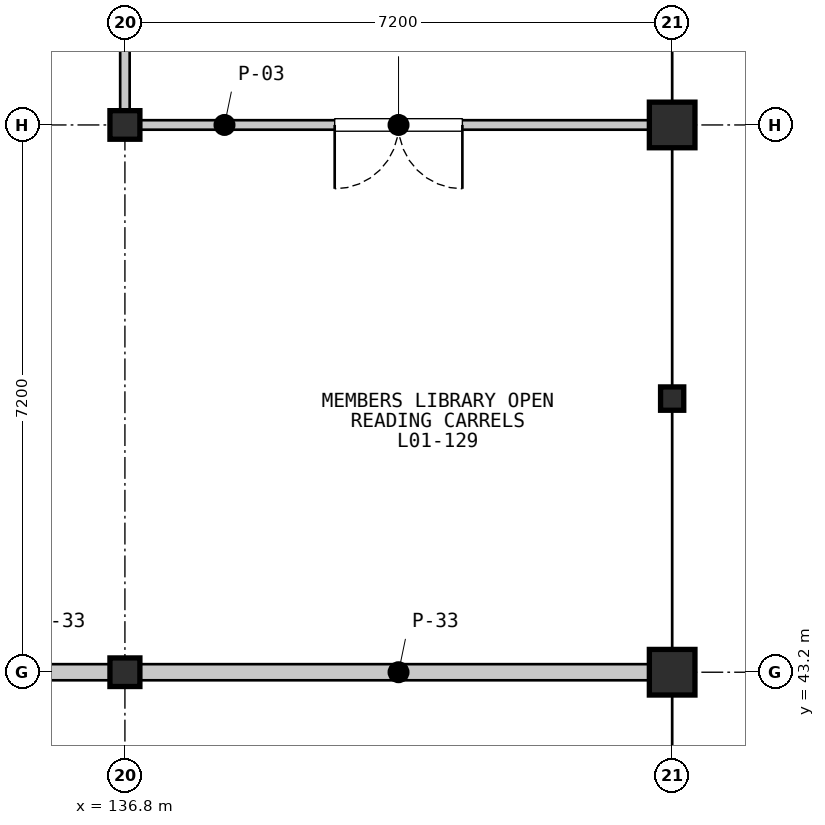
"""IFC4 building model, lengths in metres.
Left out: names, types, materials, properties, quantities, classifications, styles, units other than length and angle.
Written with IfcOpenShell. Run it as: python <this file> out.ifc"""

import sys

from ifc_helpers import new_model, si_unit, direction, frame, frame_2d, origin, origin_2d, place, context, subcontext, project, spatial, rectangle, i_section, extrude, element, fill, save


model = new_model("IFC4")
c1 = context("Model", 3, precision=1e-05, world=origin(), true_north=direction((0.0, 1.0)))
c2 = subcontext(c1, "Body", "Model", "MODEL_VIEW")
j1 = project(units=[si_unit("LENGTHUNIT", "METRE"), si_unit("PLANEANGLEUNIT", "RADIAN")], contexts=[c1])
p1 = place(None, origin())
s1 = spatial("IfcSite", under=j1, at=p1, CompositionType="ELEMENT")
p2 = place(p1, origin())
s2 = spatial("IfcBuilding", under=s1, at=p2, CompositionType="ELEMENT")
p3 = place(p2, origin())
s3 = spatial("IfcBuildingStorey", under=s2, at=p3, CompositionType="ELEMENT", Elevation=0.0)
for number, where, z_axis, x_axis in (
    (1, (136.8, 43.2, 0.0), (0.0, 0.0, 1.0), (1.0, 0.0, 0.0)),
    (2, (136.8, 50.4, 0.0), (0.0, 0.0, 1.0), (1.0, 0.0, 0.0)),
):
    element("IfcColumn", number, at=place(p3, frame(where, z_axis=z_axis, x_axis=x_axis)), inside=s3, PredefinedType="COLUMN", context=c2, shape_type="SweptSolid", body=[
        extrude(i_section(OverallWidth=0.394, OverallDepth=0.376, WebThickness=0.017, FlangeThickness=0.028, FilletRadius=0.015, at=origin_2d()), origin(), (0.0, 0.0, 1.0), 5.4),
    ])
for number, where, z_axis, x_axis in (
    (3, (144.0, 43.2, 0.0), (0.0, 0.0, 1.0), (1.0, 0.0, 0.0)),
    (4, (144.0, 50.4, 0.0), (0.0, 0.0, 1.0), (1.0, 0.0, 0.0)),
):
    element("IfcColumn", number, at=place(p3, frame(where, z_axis=z_axis, x_axis=x_axis)), inside=s3, PredefinedType="COLUMN", context=c2, shape_type="SweptSolid", body=[
        extrude(rectangle(XDim=0.6, YDim=0.6, at=origin_2d()), origin(), (0.0, 0.0, 1.0), 5.4),
    ])
p4 = place(p3, frame((144.0, 46.8, 0.0), z_axis=(0.0, 0.0, 1.0), x_axis=(1.0, 0.0, 0.0)))
e5 = element("IfcColumn", 5, at=p4, inside=s3, PredefinedType="PILASTER", context=c2, shape_type="SweptSolid", body=[
    extrude(i_section(OverallWidth=0.305, OverallDepth=0.307, WebThickness=0.01, FlangeThickness=0.015, FilletRadius=0.015, at=origin_2d()), origin(), (0.0, 0.0, 1.0), 5.4),
])
p5 = place(p3, frame((129.72, 43.2, 0.0), z_axis=(0.0, 0.0, 1.0), x_axis=(1.0, 0.0, 0.0)))
e6 = element("IfcWall", 6, at=p5, inside=s3, PredefinedType="PARTITIONING", context=c2, shape_type="SweptSolid", body=[
    extrude(rectangle(XDim=6.96, YDim=0.212, at=frame_2d((3.48, 0.0))), origin(), (0.0, 0.0, 1.0), 4.428),
])
p6 = place(p5, frame((2.64, 0.0, 0.0)))
e7 = element("IfcOpeningElement", 7, at=p6, cuts=e6, PredefinedType="OPENING", context=c2, shape_type="SweptSolid", body=[
    extrude(rectangle(XDim=1.68, YDim=2.35, at=frame_2d((0.84, 1.175))), frame((0.0, 0.116, 0.0), z_axis=(0.0, -1.0, 0.0), x_axis=(1.0, 0.0, 0.0)), (0.0, 0.0, 1.0), 0.232),
])
p7 = place(p3, frame((136.92, 43.2, 0.0), z_axis=(0.0, 0.0, 1.0), x_axis=(1.0, 0.0, 0.0)))
e8 = element("IfcWall", 8, at=p7, inside=s3, PredefinedType="PARTITIONING", context=c2, shape_type="SweptSolid", body=[
    extrude(rectangle(XDim=6.96, YDim=0.212, at=frame_2d((3.48, 0.0))), origin(), (0.0, 0.0, 1.0), 4.588),
])
p8 = place(p3, frame((143.88, 50.4, 0.0), z_axis=(0.0, 0.0, 1.0), x_axis=(-1.0, 0.0, 0.0)))
e9 = element("IfcWall", 9, at=p8, inside=s3, PredefinedType="PARTITIONING", context=c2, shape_type="SweptSolid", body=[
    extrude(rectangle(XDim=6.96, YDim=0.125, at=frame_2d((3.48, 0.0))), origin(), (0.0, 0.0, 1.0), 4.588),
])
p9 = place(p8, frame((2.64, 0.0, 0.0)))
e10 = element("IfcOpeningElement", 10, at=p9, cuts=e9, PredefinedType="OPENING", context=c2, shape_type="SweptSolid", body=[
    extrude(rectangle(XDim=1.68, YDim=2.35, at=frame_2d((0.84, 1.175))), frame((0.0, 0.073, 0.0), z_axis=(0.0, -1.0, 0.0), x_axis=(1.0, 0.0, 0.0)), (0.0, 0.0, 1.0), 0.145),
])
p10 = place(p3, frame((136.8, 50.52, 0.0), z_axis=(0.0, 0.0, 1.0), x_axis=(0.0, 1.0, 0.0)))
e11 = element("IfcWall", 11, at=p10, inside=s3, PredefinedType="PARTITIONING", context=c2, shape_type="SweptSolid", body=[
    extrude(rectangle(XDim=6.8, YDim=0.125, at=frame_2d((3.4, 0.0))), origin(), (0.0, 0.0, 1.0), 4.428),
])
p11 = place(p9, origin())
e12 = element("IfcDoor", 12, at=p11, inside=s3, OperationType="DOUBLE_DOOR_SINGLE_SWING", PredefinedType="DOOR", context=c2, shape_type="SweptSolid", body=[
    extrude(rectangle(XDim=1.68, YDim=2.35, at=frame_2d((0.84, 1.175))), frame((0.0, 0.025, 0.0), z_axis=(0.0, -1.0, 0.0), x_axis=(1.0, 0.0, 0.0)), (0.0, 0.0, 1.0), 0.05),
])
fill(e10, e12)
save(model, sys.argv[1])
